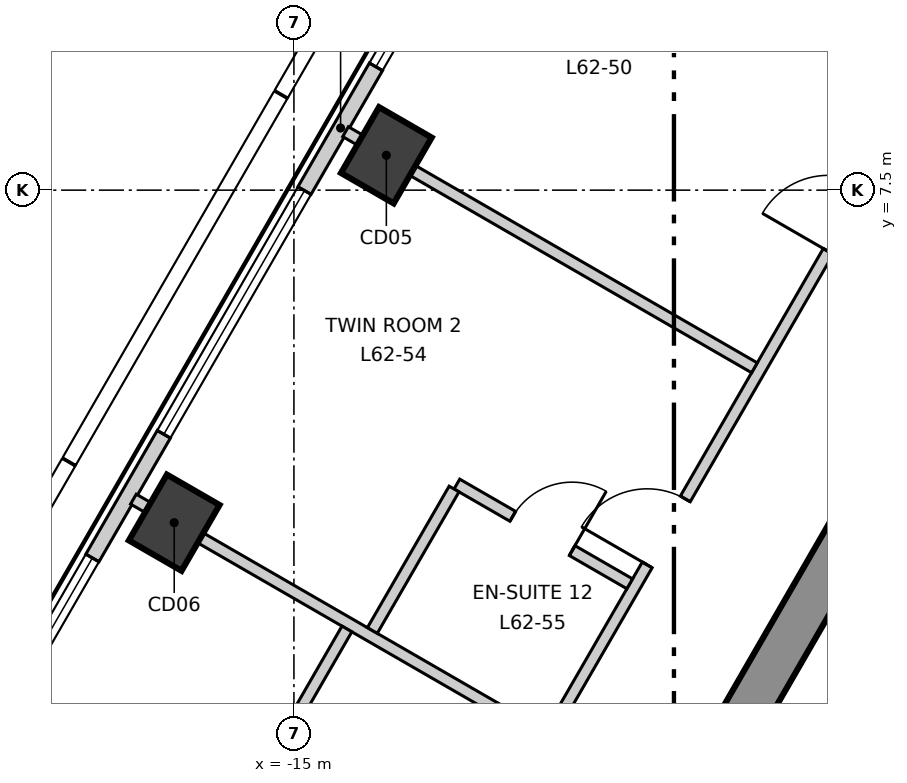
"""IFC4 building model, lengths in metres.
Left out: names, types, materials, properties, quantities, classifications, styles, units other than length and angle.
Written with IfcOpenShell. Run it as: python <this file> out.ifc"""

import sys

from ifc_helpers import new_model, si_unit, direction, frame, frame_2d, origin, origin_2d, place, context, subcontext, project, spatial, polyline, rectangle, outline, extrude, element, fill, save


model = new_model("IFC4")
c1 = context("Model", 3, precision=1e-05, world=origin(), true_north=direction((0.0, 1.0)))
c2 = subcontext(c1, "Body", "Model", "MODEL_VIEW")
j1 = project(units=[si_unit("LENGTHUNIT", "METRE"), si_unit("PLANEANGLEUNIT", "RADIAN")], contexts=[c1])
p1 = place(None, origin())
s1 = spatial("IfcSite", under=j1, at=p1, CompositionType="ELEMENT")
p2 = place(p1, origin())
s2 = spatial("IfcBuilding", under=s1, at=p2, CompositionType="ELEMENT")
p3 = place(p2, frame((0.0, 0.0, 268.3)))
s3 = spatial("IfcBuildingStorey", under=s2, at=p3, CompositionType="ELEMENT", Elevation=268.3)
p4 = place(p3, frame((-1.732, 13.3, -0.3), z_axis=(0.0, 0.0, 1.0), x_axis=(-0.500000539815, -0.866025092122, 0.0)))
e1 = element("IfcWall", 1, at=p4, inside=s3, PredefinedType="SHEAR", context=c2, shape_type="SweptSolid", body=[
    extrude(outline(polyline([(-0.173, -0.3), (1.795, -0.3), (3.763, -0.3), (5.732, -0.3), (7.7, -0.3), (9.668, -0.301), (11.637, -0.301), (13.605, -0.301), (15.573, -0.301), (17.542, -0.301), (19.51, -0.301), (21.478, -0.301), (21.131, 0.3), (19.226, 0.3), (17.321, 0.3), (15.415, 0.3), (13.51, 0.3), (11.605, 0.3), (9.699, 0.3), (7.794, 0.3), (5.889, 0.3), (3.984, 0.3), (2.078, 0.3), (0.173, 0.3), (-0.173, -0.3)])), origin(), (0.0, 0.0, 1.0), 3.6),
])
p5 = place(p4, frame((10.102, 0.0, 0.3)))
e2 = element("IfcOpeningElement", 2, at=p5, cuts=e1, PredefinedType="OPENING", context=c2, shape_type="SweptSolid", body=[
    extrude(rectangle(XDim=1.1, YDim=2.1, at=frame_2d((0.55, 1.05))), frame((0.0, 0.31, 0.0), z_axis=(0.0, -1.0, 0.0), x_axis=(1.0, 0.0, 0.0)), (0.0, 0.0, 1.0), 0.621),
])
p6 = place(p4, frame((16.378, 0.0, 0.3)))
e3 = element("IfcOpeningElement", 3, at=p6, cuts=e1, PredefinedType="OPENING", context=c2, shape_type="SweptSolid", body=[
    extrude(rectangle(XDim=0.9, YDim=2.1, at=frame_2d((0.45, 1.05))), frame((0.0, 0.31, 0.0), z_axis=(0.0, -1.0, 0.0), x_axis=(1.0, 0.0, 0.0)), (0.0, 0.0, 1.0), 0.621),
])
p7 = place(p4, frame((4.026, 0.0, 0.3)))
e4 = element("IfcOpeningElement", 4, at=p7, cuts=e1, PredefinedType="OPENING", context=c2, shape_type="SweptSolid", body=[
    extrude(rectangle(XDim=0.9, YDim=2.1, at=frame_2d((0.45, 1.05))), frame((0.0, 0.31, 0.0), z_axis=(0.0, -1.0, 0.0), x_axis=(1.0, 0.0, 0.0)), (0.0, 0.0, 1.0), 0.621),
])
for number, where, z_axis, x_axis in (
    (5, (-13.784, 7.959, -0.3), (0.0, 0.0, 1.0), (0.5, 0.866, 0.0)),
    (6, (-16.575, 3.125, -0.3), (0.0, 0.0, 1.0), (0.5, 0.866, 0.0)),
):
    element("IfcColumn", number, at=place(p3, frame(where, z_axis=z_axis, x_axis=x_axis)), inside=s3, PredefinedType="COLUMN", context=c2, shape_type="SweptSolid", body=[
        extrude(rectangle(XDim=1.0, YDim=0.8, at=origin_2d()), origin(), (0.0, 0.0, 1.0), 3.6),
    ])
p8 = place(p3, frame((-2.577, 28.771, 0.0), z_axis=(0.0, 0.0, 1.0), x_axis=(-0.49999909388, -0.866025926932, 0.0)))
e7 = element("IfcWall", 7, at=p8, inside=s3, PredefinedType="ELEMENTEDWALL", context=c2, shape_type="SweptSolid", body=[
    extrude(rectangle(XDim=47.236, YDim=0.2, at=frame_2d((23.618, 0.0))), origin(), (0.0, 0.0, 1.0), 3.3),
])
p9 = place(p8, frame((2.243, 0.0, 0.9)))
e8 = element("IfcOpeningElement", 8, at=p9, cuts=e7, PredefinedType="OPENING", context=c2, shape_type="SweptSolid", body=[
    extrude(rectangle(XDim=3.7, YDim=2.2, at=frame_2d((1.85, 1.1))), frame((0.0, 0.11, 0.0), z_axis=(0.0, -1.0, 0.0), x_axis=(1.0, 0.0, 0.0)), (0.0, 0.0, 1.0), 0.22),
])
p10 = place(p8, frame((7.824, 0.0, 0.9)))
e9 = element("IfcOpeningElement", 9, at=p10, cuts=e7, PredefinedType="OPENING", context=c2, shape_type="SweptSolid", body=[
    extrude(rectangle(XDim=3.7, YDim=2.2, at=frame_2d((1.85, 1.1))), frame((0.0, 0.11, 0.0), z_axis=(0.0, -1.0, 0.0), x_axis=(1.0, 0.0, 0.0)), (0.0, 0.0, 1.0), 0.22),
])
p11 = place(p8, frame((13.406, 0.0, 0.9)))
e10 = element("IfcOpeningElement", 10, at=p11, cuts=e7, PredefinedType="OPENING", context=c2, shape_type="SweptSolid", body=[
    extrude(rectangle(XDim=3.7, YDim=2.2, at=frame_2d((1.85, 1.1))), frame((0.0, 0.11, 0.0), z_axis=(0.0, -1.0, 0.0), x_axis=(1.0, 0.0, 0.0)), (0.0, 0.0, 1.0), 0.22),
])
p12 = place(p8, frame((18.987, 0.0, 0.9)))
e11 = element("IfcOpeningElement", 11, at=p12, cuts=e7, PredefinedType="OPENING", context=c2, shape_type="SweptSolid", body=[
    extrude(rectangle(XDim=3.7, YDim=2.2, at=frame_2d((1.85, 1.1))), frame((0.0, 0.11, 0.0), z_axis=(0.0, -1.0, 0.0), x_axis=(1.0, 0.0, 0.0)), (0.0, 0.0, 1.0), 0.22),
])
p13 = place(p8, frame((24.569, 0.0, 0.9)))
e12 = element("IfcOpeningElement", 12, at=p13, cuts=e7, PredefinedType="OPENING", context=c2, shape_type="SweptSolid", body=[
    extrude(rectangle(XDim=3.7, YDim=2.2, at=frame_2d((1.85, 1.1))), frame((0.0, 0.11, 0.0), z_axis=(0.0, -1.0, 0.0), x_axis=(1.0, 0.0, 0.0)), (0.0, 0.0, 1.0), 0.22),
])
p14 = place(p8, frame((30.15, 0.0, 0.9)))
e13 = element("IfcOpeningElement", 13, at=p14, cuts=e7, PredefinedType="OPENING", context=c2, shape_type="SweptSolid", body=[
    extrude(rectangle(XDim=3.7, YDim=2.2, at=frame_2d((1.85, 1.1))), frame((0.0, 0.11, 0.0), z_axis=(0.0, -1.0, 0.0), x_axis=(1.0, 0.0, 0.0)), (0.0, 0.0, 1.0), 0.22),
])
p15 = place(p8, frame((35.731, 0.0, 0.9)))
e14 = element("IfcOpeningElement", 14, at=p15, cuts=e7, PredefinedType="OPENING", context=c2, shape_type="SweptSolid", body=[
    extrude(rectangle(XDim=3.7, YDim=2.2, at=frame_2d((1.85, 1.1))), frame((0.0, 0.11, 0.0), z_axis=(0.0, -1.0, 0.0), x_axis=(1.0, 0.0, 0.0)), (0.0, 0.0, 1.0), 0.22),
])
p16 = place(p8, frame((41.313, 0.0, 0.9)))
e15 = element("IfcOpeningElement", 15, at=p16, cuts=e7, PredefinedType="OPENING", context=c2, shape_type="SweptSolid", body=[
    extrude(rectangle(XDim=3.7, YDim=2.2, at=frame_2d((1.85, 1.1))), frame((0.0, 0.11, 0.0), z_axis=(0.0, -1.0, 0.0), x_axis=(1.0, 0.0, 0.0)), (0.0, 0.0, 1.0), 0.22),
])
p17 = place(p3, frame((-17.678, -10.12, 0.0), z_axis=(0.0, 0.0, 1.0), x_axis=(0.49998824015, 0.86603219323, 0.0)))
e16 = element("IfcWall", 16, at=p17, inside=s3, PredefinedType="PARTITIONING", context=c2, shape_type="SweptSolid", body=[
    extrude(rectangle(XDim=35.357, YDim=0.15, at=frame_2d((17.678, 0.0))), origin(), (0.0, 0.0, 1.0), 3.3),
])
p18 = place(p17, frame((31.607, 0.0, 0.0)))
e17 = element("IfcOpeningElement", 17, at=p18, cuts=e16, PredefinedType="OPENING", context=c2, shape_type="SweptSolid", body=[
    extrude(rectangle(XDim=1.0, YDim=2.1, at=frame_2d((0.5, 1.05))), frame((0.0, 0.085, 0.0), z_axis=(0.0, -1.0, 0.0), x_axis=(1.0, 0.0, 0.0)), (0.0, 0.0, 1.0), 0.17),
])
p19 = place(p17, frame((19.416, 0.0, 0.0)))
e18 = element("IfcOpeningElement", 18, at=p19, cuts=e16, PredefinedType="OPENING", context=c2, shape_type="SweptSolid", body=[
    extrude(rectangle(XDim=1.0, YDim=2.1, at=frame_2d((0.5, 1.05))), frame((0.0, 0.085, 0.0), z_axis=(0.0, -1.0, 0.0), x_axis=(1.0, 0.0, 0.0)), (0.0, 0.0, 1.0), 0.17),
])
p20 = place(p17, frame((24.916, 0.0, 0.0)))
e19 = element("IfcOpeningElement", 19, at=p20, cuts=e16, PredefinedType="OPENING", context=c2, shape_type="SweptSolid", body=[
    extrude(rectangle(XDim=0.9, YDim=2.1, at=frame_2d((0.45, 1.05))), frame((0.0, 0.085, 0.0), z_axis=(0.0, -1.0, 0.0), x_axis=(1.0, 0.0, 0.0)), (0.0, 0.0, 1.0), 0.17),
])
p21 = place(p17, frame((22.816, 0.0, 0.0)))
e20 = element("IfcOpeningElement", 20, at=p21, cuts=e16, PredefinedType="OPENING", context=c2, shape_type="SweptSolid", body=[
    extrude(rectangle(XDim=0.9, YDim=2.1, at=frame_2d((0.45, 1.05))), frame((0.0, 0.085, 0.0), z_axis=(0.0, -1.0, 0.0), x_axis=(1.0, 0.0, 0.0)), (0.0, 0.0, 1.0), 0.17),
])
p22 = place(p17, frame((14.654, 0.0, 0.0)))
e21 = element("IfcOpeningElement", 21, at=p22, cuts=e16, PredefinedType="OPENING", context=c2, shape_type="SweptSolid", body=[
    extrude(rectangle(XDim=1.0, YDim=2.1, at=frame_2d((0.5, 1.05))), frame((0.0, 0.085, 0.0), z_axis=(0.0, -1.0, 0.0), x_axis=(1.0, 0.0, 0.0)), (0.0, 0.0, 1.0), 0.17),
])
p23 = place(p17, frame((7.672, 0.0, 0.0)))
e22 = element("IfcOpeningElement", 22, at=p23, cuts=e16, PredefinedType="OPENING", context=c2, shape_type="SweptSolid", body=[
    extrude(rectangle(XDim=1.0, YDim=2.1, at=frame_2d((0.5, 1.05))), frame((0.0, 0.085, 0.0), z_axis=(0.0, -1.0, 0.0), x_axis=(1.0, 0.0, 0.0)), (0.0, 0.0, 1.0), 0.17),
])
p24 = place(p17, frame((2.69, 0.0, 0.0)))
e23 = element("IfcOpeningElement", 23, at=p24, cuts=e16, PredefinedType="OPENING", context=c2, shape_type="SweptSolid", body=[
    extrude(rectangle(XDim=1.0, YDim=2.1, at=frame_2d((0.5, 1.05))), frame((0.0, 0.085, 0.0), z_axis=(0.0, -1.0, 0.0), x_axis=(1.0, 0.0, 0.0)), (0.0, 0.0, 1.0), 0.17),
])
p25 = place(p3, frame((-17.112, 3.435, 0.0), z_axis=(0.0, 0.0, 1.0), x_axis=(0.866043575568, -0.499968524226, 0.0)))
e24 = element("IfcWall", 24, at=p25, inside=s3, PredefinedType="PARTITIONING", context=c2, shape_type="SweptSolid", body=[
    extrude(rectangle(XDim=6.212, YDim=0.15, at=frame_2d((3.106, 0.0))), origin(), (0.0, 0.0, 1.0), 3.3),
])
p26 = place(p3, frame((-14.321, 8.269, 0.0), z_axis=(0.0, 0.0, 1.0), x_axis=(0.866043575568, -0.499968524226, 0.0)))
e25 = element("IfcWall", 25, at=p26, inside=s3, PredefinedType="PARTITIONING", context=c2, shape_type="SweptSolid", body=[
    extrude(rectangle(XDim=6.212, YDim=0.15, at=frame_2d((3.106, 0.0))), origin(), (0.0, 0.0, 1.0), 2.8),
])
p27 = place(p3, frame((-8.732, 10.426, 0.0), z_axis=(0.0, 0.0, 1.0), x_axis=(0.866014668023, -0.500018594424, 0.0)))
e26 = element("IfcWall", 26, at=p27, inside=s3, PredefinedType="PARTITIONING", context=c2, shape_type="SweptSolid", body=[
    extrude(rectangle(XDim=2.45, YDim=0.15, at=frame_2d((1.225, 0.0))), origin(), (0.0, 0.0, 1.0), 3.3),
])
p28 = place(p3, frame((-12.856, 3.633, 0.0), z_axis=(0.0, 0.0, 1.0), x_axis=(0.866163910271, -0.499760022954, 0.0)))
e27 = element("IfcWall", 27, at=p28, inside=s3, PredefinedType="PARTITIONING", context=c2, shape_type="SweptSolid", body=[
    extrude(rectangle(XDim=2.625, YDim=0.15, at=frame_2d((1.312, 0.0))), origin(), (0.0, 0.0, 1.0), 3.3),
])
p29 = place(p28, frame((0.85, 0.0, 0.0)))
e28 = element("IfcOpeningElement", 28, at=p29, cuts=e27, PredefinedType="OPENING", context=c2, shape_type="SweptSolid", body=[
    extrude(rectangle(XDim=0.9, YDim=2.1, at=frame_2d((0.45, 1.05))), frame((0.0, 0.085, 0.0), z_axis=(0.0, -1.0, 0.0), x_axis=(1.0, 0.0, 0.0)), (0.0, 0.0, 1.0), 0.17),
])
p30 = place(p3, frame((-13.968, 1.707, 0.0), z_axis=(0.0, 0.0, 1.0), x_axis=(0.500158362642, 0.865933953763, 0.0)))
e29 = element("IfcWall", 29, at=p30, inside=s3, PredefinedType="PARTITIONING", context=c2, shape_type="SweptSolid", body=[
    extrude(rectangle(XDim=2.149, YDim=0.15, at=frame_2d((1.075, 0.0))), origin(), (0.0, 0.0, 1.0), 3.3),
])
p31 = place(p3, frame((-15.765, -0.807, 0.0), z_axis=(0.0, 0.0, 1.0), x_axis=(0.499729678228, 0.86618141789, 0.0)))
e30 = element("IfcWall", 30, at=p31, inside=s3, PredefinedType="PARTITIONING", context=c2, shape_type="SweptSolid", body=[
    extrude(rectangle(XDim=2.925, YDim=0.15, at=frame_2d((1.463, 0.0))), origin(), (0.0, 0.0, 1.0), 3.3),
])
p32 = place(p3, frame((-8.326, -0.62, 0.0), z_axis=(0.0, 0.0, 1.0), x_axis=(0.500023687443, 0.866011727401, 0.0)))
e31 = element("IfcWall", 31, at=p32, inside=s3, PredefinedType="SOLIDWALL", context=c2, shape_type="SweptSolid", body=[
    extrude(rectangle(XDim=2.9, YDim=0.2, at=frame_2d((1.45, 0.0))), origin(), (0.0, 0.0, 1.0), 3.3),
])
p33 = place(p12, origin())
e32 = element("IfcWindow", 32, at=p33, inside=s3, PartitioningType="SINGLE_PANEL", PredefinedType="WINDOW", context=c2, shape_type="SweptSolid", body=[
    extrude(rectangle(XDim=3.7, YDim=2.2, at=frame_2d((1.85, 1.1))), frame((0.0, 0.03, 0.0), z_axis=(0.0, -1.0, 0.0), x_axis=(1.0, 0.0, 0.0)), (0.0, 0.0, 1.0), 0.06),
])
fill(e11, e32)
p34 = place(p13, origin())
e33 = element("IfcWindow", 33, at=p34, inside=s3, PartitioningType="SINGLE_PANEL", PredefinedType="WINDOW", context=c2, shape_type="SweptSolid", body=[
    extrude(rectangle(XDim=3.7, YDim=2.2, at=frame_2d((1.85, 1.1))), frame((0.0, 0.03, 0.0), z_axis=(0.0, -1.0, 0.0), x_axis=(1.0, 0.0, 0.0)), (0.0, 0.0, 1.0), 0.06),
])
fill(e12, e33)
p35 = place(p14, origin())
e34 = element("IfcWindow", 34, at=p35, inside=s3, PartitioningType="SINGLE_PANEL", PredefinedType="WINDOW", context=c2, shape_type="SweptSolid", body=[
    extrude(rectangle(XDim=3.7, YDim=2.2, at=frame_2d((1.85, 1.1))), frame((0.0, 0.03, 0.0), z_axis=(0.0, -1.0, 0.0), x_axis=(1.0, 0.0, 0.0)), (0.0, 0.0, 1.0), 0.06),
])
fill(e13, e34)
p36 = place(p19, origin())
e35 = element("IfcDoor", 35, at=p36, inside=s3, OperationType="SINGLE_SWING_RIGHT", PredefinedType="DOOR", context=c2, shape_type="SweptSolid", body=[
    extrude(rectangle(XDim=1.0, YDim=2.1, at=frame_2d((0.5, 1.05))), frame((0.0, 0.025, 0.0), z_axis=(0.0, -1.0, 0.0), x_axis=(1.0, 0.0, 0.0)), (0.0, 0.0, 1.0), 0.05),
])
fill(e18, e35)
p37 = place(p22, origin())
e36 = element("IfcDoor", 36, at=p37, inside=s3, OperationType="SINGLE_SWING_RIGHT", PredefinedType="DOOR", context=c2, shape_type="SweptSolid", body=[
    extrude(rectangle(XDim=1.0, YDim=2.1, at=frame_2d((0.5, 1.05))), frame((0.0, 0.025, 0.0), z_axis=(0.0, -1.0, 0.0), x_axis=(1.0, 0.0, 0.0)), (0.0, 0.0, 1.0), 0.05),
])
fill(e21, e36)
p38 = place(p29, origin())
e37 = element("IfcDoor", 37, at=p38, inside=s3, OperationType="SINGLE_SWING_LEFT", PredefinedType="DOOR", context=c2, shape_type="SweptSolid", body=[
    extrude(rectangle(XDim=0.9, YDim=2.1, at=frame_2d((0.45, 1.05))), frame((0.0, 0.025, 0.0), z_axis=(0.0, -1.0, 0.0), x_axis=(1.0, 0.0, 0.0)), (0.0, 0.0, 1.0), 0.05),
])
fill(e28, e37)
save(model, sys.argv[1])
